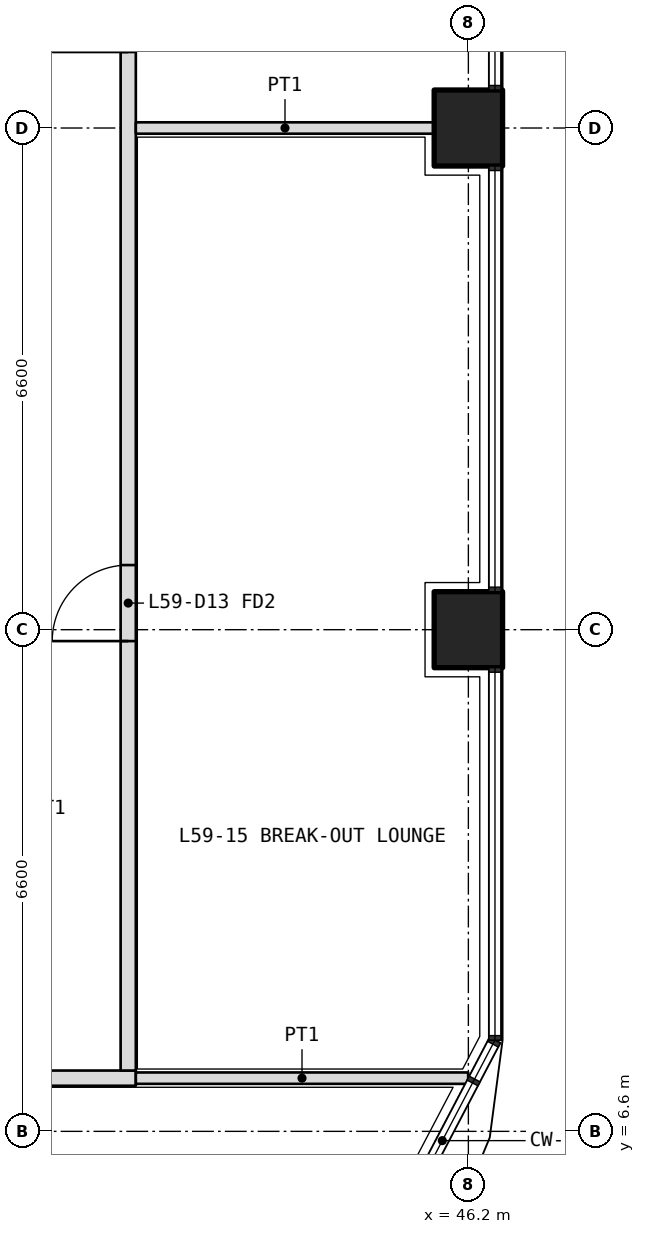
"""IFC4 building model, lengths in metres.
Left out: names, types, materials, properties, quantities, classifications, styles, units other than length and angle.
Written with IfcOpenShell. Run it as: python <this file> out.ifc"""

import sys

from ifc_helpers import new_model, si_unit, direction, frame, frame_2d, origin, origin_2d, place, context, subcontext, project, spatial, rectangle, extrude, element, fill, save


model = new_model("IFC4")
c1 = context("Model", 3, precision=1e-05, world=origin(), true_north=direction((0.0, 1.0)))
c2 = subcontext(c1, "Body", "Model", "MODEL_VIEW")
j1 = project(units=[si_unit("LENGTHUNIT", "METRE"), si_unit("PLANEANGLEUNIT", "RADIAN")], contexts=[c1])
p1 = place(None, origin())
s1 = spatial("IfcSite", under=j1, at=p1, CompositionType="ELEMENT")
p2 = place(p1, origin())
s2 = spatial("IfcBuilding", under=s1, at=p2, CompositionType="ELEMENT")
p3 = place(p2, frame((0.0, 0.0, 258.6)))
s3 = spatial("IfcBuildingStorey", under=s2, at=p3, CompositionType="ELEMENT", Elevation=258.6)
for number, where, z_axis, x_axis in (
    (1, (46.2, 13.2, 0.0), (0.0, 0.0, 1.0), (0.0, 1.0, 0.0)),
    (2, (46.2, 19.8, 0.0), (0.0, 0.0, 1.0), (0.0, 1.0, 0.0)),
):
    element("IfcColumn", number, at=place(p3, frame(where, z_axis=z_axis, x_axis=x_axis)), inside=s3, PredefinedType="COLUMN", context=c2, shape_type="SweptSolid", body=[
        extrude(rectangle(XDim=1.0, YDim=0.9, at=origin_2d()), origin(), (0.0, 0.0, 1.0), 4.2),
    ])
p4 = place(p3, frame((19.8, 7.3, 0.0), z_axis=(0.0, 0.0, 1.0), x_axis=(1.0, 0.0, 0.0)))
e3 = element("IfcWall", 3, at=p4, inside=s3, PredefinedType="PARTITIONING", context=c2, shape_type="SweptSolid", body=[
    extrude(rectangle(XDim=22.025, YDim=0.2, at=frame_2d((11.012, 0.0))), origin(), (0.0, 0.0, 1.0), 3.0),
])
p5 = place(p4, frame((1.15, 0.0, 0.0)))
e4 = element("IfcOpeningElement", 4, at=p5, cuts=e3, PredefinedType="OPENING", context=c2, shape_type="SweptSolid", body=[
    extrude(rectangle(XDim=1.0, YDim=2.1, at=frame_2d((0.5, 1.05))), frame((0.0, 0.11, 0.0), z_axis=(0.0, -1.0, 0.0), x_axis=(1.0, 0.0, 0.0)), (0.0, 0.0, 1.0), 0.22),
])
p6 = place(p4, frame((4.55, 0.0, 0.0)))
e5 = element("IfcOpeningElement", 5, at=p6, cuts=e3, PredefinedType="OPENING", context=c2, shape_type="SweptSolid", body=[
    extrude(rectangle(XDim=1.0, YDim=2.1, at=frame_2d((0.5, 1.05))), frame((0.0, 0.11, 0.0), z_axis=(0.0, -1.0, 0.0), x_axis=(1.0, 0.0, 0.0)), (0.0, 0.0, 1.0), 0.22),
])
p7 = place(p4, frame((7.85, 0.0, 0.0)))
e6 = element("IfcOpeningElement", 6, at=p7, cuts=e3, PredefinedType="OPENING", context=c2, shape_type="SweptSolid", body=[
    extrude(rectangle(XDim=1.0, YDim=2.1, at=frame_2d((0.5, 1.05))), frame((0.0, 0.11, 0.0), z_axis=(0.0, -1.0, 0.0), x_axis=(1.0, 0.0, 0.0)), (0.0, 0.0, 1.0), 0.22),
])
p8 = place(p4, frame((15.413, 0.0, 0.0)))
e7 = element("IfcOpeningElement", 7, at=p8, cuts=e3, PredefinedType="OPENING", context=c2, shape_type="SweptSolid", body=[
    extrude(rectangle(XDim=1.0, YDim=2.1, at=frame_2d((0.5, 1.05))), frame((0.0, 0.11, 0.0), z_axis=(0.0, -1.0, 0.0), x_axis=(1.0, 0.0, 0.0)), (0.0, 0.0, 1.0), 0.22),
])
p9 = place(p3, frame((41.725, 7.4, 0.0), z_axis=(0.0, 0.0, 1.0), x_axis=(0.0, 1.0, 0.0)))
e8 = element("IfcWall", 8, at=p9, inside=s3, PredefinedType="PARTITIONING", context=c2, shape_type="SweptSolid", body=[
    extrude(rectangle(XDim=31.4, YDim=0.2, at=frame_2d((15.7, 0.0))), origin(), (0.0, 0.0, 1.0), 3.0),
])
p10 = place(p9, frame((5.65, 0.0, 0.0)))
e9 = element("IfcOpeningElement", 9, at=p10, cuts=e8, PredefinedType="OPENING", context=c2, shape_type="SweptSolid", body=[
    extrude(rectangle(XDim=1.0, YDim=2.1, at=frame_2d((0.5, 1.05))), frame((0.0, 0.11, 0.0), z_axis=(0.0, -1.0, 0.0), x_axis=(1.0, 0.0, 0.0)), (0.0, 0.0, 1.0), 0.22),
])
p11 = place(p9, frame((13.4, 0.0, 0.0)))
e10 = element("IfcOpeningElement", 10, at=p11, cuts=e8, PredefinedType="OPENING", context=c2, shape_type="SweptSolid", body=[
    extrude(rectangle(XDim=1.0, YDim=2.1, at=frame_2d((0.5, 1.05))), frame((0.0, 0.11, 0.0), z_axis=(0.0, -1.0, 0.0), x_axis=(1.0, 0.0, 0.0)), (0.0, 0.0, 1.0), 0.22),
])
p12 = place(p9, frame((16.75, 0.0, 0.0)))
e11 = element("IfcOpeningElement", 11, at=p12, cuts=e8, PredefinedType="OPENING", context=c2, shape_type="SweptSolid", body=[
    extrude(rectangle(XDim=0.9, YDim=2.1, at=frame_2d((0.45, 1.05))), frame((0.0, 0.11, 0.0), z_axis=(0.0, -1.0, 0.0), x_axis=(1.0, 0.0, 0.0)), (0.0, 0.0, 1.0), 0.22),
])
p13 = place(p9, frame((24.65, 0.0, 0.0)))
e12 = element("IfcOpeningElement", 12, at=p13, cuts=e8, PredefinedType="OPENING", context=c2, shape_type="SweptSolid", body=[
    extrude(rectangle(XDim=1.2, YDim=2.1, at=frame_2d((0.6, 1.05))), frame((0.0, 0.11, 0.0), z_axis=(0.0, -1.0, 0.0), x_axis=(1.0, 0.0, 0.0)), (0.0, 0.0, 1.0), 0.22),
])
p14 = place(p3, frame((46.198, 7.3, 0.0), z_axis=(0.0, 0.0, 1.0), x_axis=(-1.0, 0.0, 0.0)))
e13 = element("IfcWall", 13, at=p14, inside=s3, PredefinedType="PARTITIONING", context=c2, shape_type="SweptSolid", body=[
    extrude(rectangle(XDim=4.373, YDim=0.15, at=frame_2d((2.186, 0.0))), origin(), (0.0, 0.0, 1.0), 2.7),
])
p15 = place(p3, frame((45.75, 19.8, 0.0), z_axis=(0.0, 0.0, 1.0), x_axis=(-1.0, 0.0, 0.0)))
e14 = element("IfcWall", 14, at=p15, inside=s3, PredefinedType="PARTITIONING", context=c2, shape_type="SweptSolid", body=[
    extrude(rectangle(XDim=3.925, YDim=0.15, at=frame_2d((1.962, 0.0))), origin(), (0.0, 0.0, 1.0), 3.0),
])
p16 = place(p10, origin())
e15 = element("IfcDoor", 15, at=p16, inside=s3, OperationType="SINGLE_SWING_LEFT", PredefinedType="DOOR", context=c2, shape_type="SweptSolid", body=[
    extrude(rectangle(XDim=1.0, YDim=2.1, at=frame_2d((0.5, 1.05))), frame((0.0, 0.025, 0.0), z_axis=(0.0, -1.0, 0.0), x_axis=(1.0, 0.0, 0.0)), (0.0, 0.0, 1.0), 0.05),
])
fill(e9, e15)
p17 = place(p11, origin())
e16 = element("IfcDoor", 16, at=p17, inside=s3, OperationType="SINGLE_SWING_LEFT", PredefinedType="DOOR", context=c2, shape_type="SweptSolid", body=[
    extrude(rectangle(XDim=1.0, YDim=2.1, at=frame_2d((0.5, 1.05))), frame((0.0, 0.025, 0.0), z_axis=(0.0, -1.0, 0.0), x_axis=(1.0, 0.0, 0.0)), (0.0, 0.0, 1.0), 0.05),
])
fill(e10, e16)
save(model, sys.argv[1])
